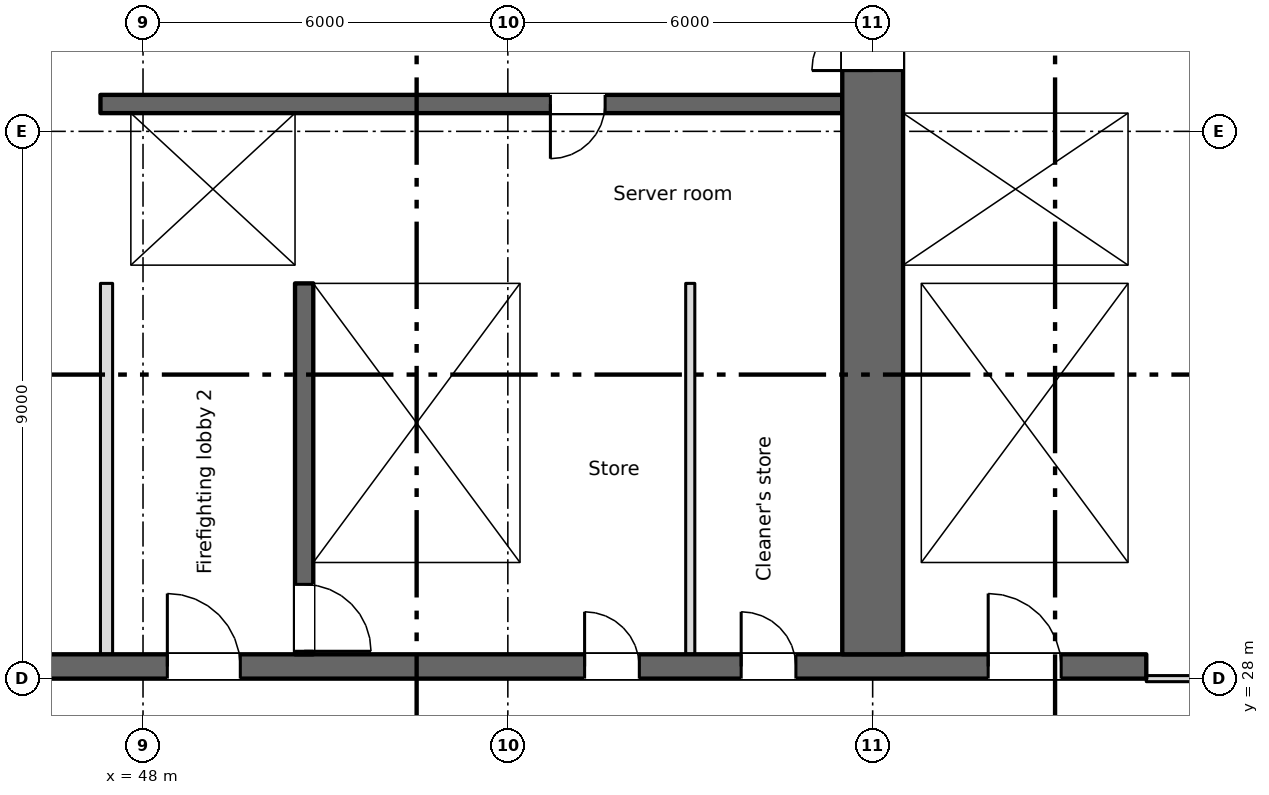
"""IFC4 building model, lengths in metres.
Left out: names, types, materials, properties, quantities, classifications, styles, units other than length and angle.
Written with IfcOpenShell. Run it as: python <this file> out.ifc"""

import sys

from ifc_helpers import new_model, si_unit, direction, frame, frame_2d, origin, place, context, subcontext, project, spatial, rectangle, extrude, element, fill, save


model = new_model("IFC4")
c1 = context("Model", 3, precision=1e-05, world=origin(), true_north=direction((0.0, 1.0)))
c2 = subcontext(c1, "Body", "Model", "MODEL_VIEW")
j1 = project(units=[si_unit("LENGTHUNIT", "METRE"), si_unit("PLANEANGLEUNIT", "RADIAN")], contexts=[c1])
p1 = place(None, origin())
s1 = spatial("IfcSite", under=j1, at=p1, CompositionType="ELEMENT")
p2 = place(p1, origin())
s2 = spatial("IfcBuilding", under=s1, at=p2, CompositionType="ELEMENT")
p3 = place(p2, frame((0.0, 0.0, 60.0)))
s3 = spatial("IfcBuildingStorey", under=s2, at=p3, CompositionType="ELEMENT", Elevation=60.0)
p4 = place(p3, frame((6.7, 28.2, 0.0), z_axis=(0.0, 0.0, 1.0), x_axis=(1.0, 0.0, 0.0)))
e1 = element("IfcWall", 1, at=p4, inside=s3, PredefinedType="SHEAR", context=c2, shape_type="SweptSolid", body=[
    extrude(rectangle(XDim=57.8, YDim=0.4, at=frame_2d((28.9, 0.0))), origin(), (0.0, 0.0, 1.0), 3.35),
])
p5 = place(p4, frame((13.85, 0.0, 0.0)))
e2 = element("IfcOpeningElement", 2, at=p5, cuts=e1, PredefinedType="OPENING", context=c2, shape_type="SweptSolid", body=[
    extrude(rectangle(XDim=0.9, YDim=2.1, at=frame_2d((0.45, 1.05))), frame((0.0, 0.21, 0.0), z_axis=(0.0, -1.0, 0.0), x_axis=(1.0, 0.0, 0.0)), (0.0, 0.0, 1.0), 0.42),
])
p6 = place(p4, frame((48.562, 0.0, 0.0)))
e3 = element("IfcOpeningElement", 3, at=p6, cuts=e1, PredefinedType="OPENING", context=c2, shape_type="SweptSolid", body=[
    extrude(rectangle(XDim=0.9, YDim=2.1, at=frame_2d((0.45, 1.05))), frame((0.0, 0.21, 0.0), z_axis=(0.0, -1.0, 0.0), x_axis=(1.0, 0.0, 0.0)), (0.0, 0.0, 1.0), 0.42),
])
p7 = place(p4, frame((51.137, 0.0, 0.0)))
e4 = element("IfcOpeningElement", 4, at=p7, cuts=e1, PredefinedType="OPENING", context=c2, shape_type="SweptSolid", body=[
    extrude(rectangle(XDim=0.9, YDim=2.1, at=frame_2d((0.45, 1.05))), frame((0.0, 0.21, 0.0), z_axis=(0.0, -1.0, 0.0), x_axis=(1.0, 0.0, 0.0)), (0.0, 0.0, 1.0), 0.42),
])
p8 = place(p4, frame((1.35, 0.0, 0.0)))
e5 = element("IfcOpeningElement", 5, at=p8, cuts=e1, PredefinedType="OPENING", context=c2, shape_type="SweptSolid", body=[
    extrude(rectangle(XDim=0.9, YDim=2.1, at=frame_2d((0.45, 1.05))), frame((0.0, 0.21, 0.0), z_axis=(0.0, -1.0, 0.0), x_axis=(1.0, 0.0, 0.0)), (0.0, 0.0, 1.0), 0.42),
])
p9 = place(p4, frame((4.7, 0.0, 0.0)))
e6 = element("IfcOpeningElement", 6, at=p9, cuts=e1, PredefinedType="OPENING", context=c2, shape_type="SweptSolid", body=[
    extrude(rectangle(XDim=1.2, YDim=2.1, at=frame_2d((0.6, 1.05))), frame((0.0, 0.21, 0.0), z_axis=(0.0, -1.0, 0.0), x_axis=(1.0, 0.0, 0.0)), (0.0, 0.0, 1.0), 0.42),
])
p10 = place(p4, frame((31.7, 0.0, 0.0)))
e7 = element("IfcOpeningElement", 7, at=p10, cuts=e1, PredefinedType="OPENING", context=c2, shape_type="SweptSolid", body=[
    extrude(rectangle(XDim=1.2, YDim=2.1, at=frame_2d((0.6, 1.05))), frame((0.0, 0.21, 0.0), z_axis=(0.0, -1.0, 0.0), x_axis=(1.0, 0.0, 0.0)), (0.0, 0.0, 1.0), 0.42),
])
p11 = place(p4, frame((55.2, 0.0, 0.0)))
e8 = element("IfcOpeningElement", 8, at=p11, cuts=e1, PredefinedType="OPENING", context=c2, shape_type="SweptSolid", body=[
    extrude(rectangle(XDim=1.2, YDim=2.1, at=frame_2d((0.6, 1.05))), frame((0.0, 0.21, 0.0), z_axis=(0.0, -1.0, 0.0), x_axis=(1.0, 0.0, 0.0)), (0.0, 0.0, 1.0), 0.42),
])
p12 = place(p4, frame((21.7, 0.0, 0.0)))
e9 = element("IfcOpeningElement", 9, at=p12, cuts=e1, PredefinedType="OPENING", context=c2, shape_type="SweptSolid", body=[
    extrude(rectangle(XDim=1.2, YDim=2.1, at=frame_2d((0.6, 1.05))), frame((0.0, 0.21, 0.0), z_axis=(0.0, -1.0, 0.0), x_axis=(1.0, 0.0, 0.0)), (0.0, 0.0, 1.0), 0.42),
])
p13 = place(p4, frame((41.7, 0.0, 0.0)))
e10 = element("IfcOpeningElement", 10, at=p13, cuts=e1, PredefinedType="OPENING", context=c2, shape_type="SweptSolid", body=[
    extrude(rectangle(XDim=1.2, YDim=2.1, at=frame_2d((0.6, 1.05))), frame((0.0, 0.21, 0.0), z_axis=(0.0, -1.0, 0.0), x_axis=(1.0, 0.0, 0.0)), (0.0, 0.0, 1.0), 0.42),
])
p14 = place(p4, frame((24.85, 0.0, 0.0)))
e11 = element("IfcOpeningElement", 11, at=p14, cuts=e1, PredefinedType="OPENING", context=c2, shape_type="SweptSolid", body=[
    extrude(rectangle(XDim=2.4, YDim=2.1, at=frame_2d((1.2, 1.05))), frame((0.0, 0.21, 0.0), z_axis=(0.0, -1.0, 0.0), x_axis=(1.0, 0.0, 0.0)), (0.0, 0.0, 1.0), 0.42),
])
p15 = place(p4, frame((37.35, 0.0, 0.0)))
e12 = element("IfcOpeningElement", 12, at=p15, cuts=e1, PredefinedType="OPENING", context=c2, shape_type="SweptSolid", body=[
    extrude(rectangle(XDim=2.4, YDim=2.1, at=frame_2d((1.2, 1.05))), frame((0.0, 0.21, 0.0), z_axis=(0.0, -1.0, 0.0), x_axis=(1.0, 0.0, 0.0)), (0.0, 0.0, 1.0), 0.42),
])
p16 = place(p4, frame((7.85, 0.0, 0.0)))
e13 = element("IfcOpeningElement", 13, at=p16, cuts=e1, PredefinedType="OPENING", context=c2, shape_type="SweptSolid", body=[
    extrude(rectangle(XDim=2.4, YDim=2.1, at=frame_2d((1.2, 1.05))), frame((0.0, 0.21, 0.0), z_axis=(0.0, -1.0, 0.0), x_axis=(1.0, 0.0, 0.0)), (0.0, 0.0, 1.0), 0.42),
])
p17 = place(p4, frame((28.85, 0.0, 0.0)))
e14 = element("IfcOpeningElement", 14, at=p17, cuts=e1, PredefinedType="OPENING", context=c2, shape_type="SweptSolid", body=[
    extrude(rectangle(XDim=0.9, YDim=2.1, at=frame_2d((0.45, 1.05))), frame((0.0, 0.21, 0.0), z_axis=(0.0, -1.0, 0.0), x_axis=(1.0, 0.0, 0.0)), (0.0, 0.0, 1.0), 0.42),
])
p18 = place(p4, frame((34.85, 0.0, 0.0)))
e15 = element("IfcOpeningElement", 15, at=p18, cuts=e1, PredefinedType="OPENING", context=c2, shape_type="SweptSolid", body=[
    extrude(rectangle(XDim=0.9, YDim=2.1, at=frame_2d((0.45, 1.05))), frame((0.0, 0.21, 0.0), z_axis=(0.0, -1.0, 0.0), x_axis=(1.0, 0.0, 0.0)), (0.0, 0.0, 1.0), 0.42),
])
p19 = place(p3, frame((64.35, 34.8, 0.0), z_axis=(0.0, 0.0, 1.0), x_axis=(0.0, 1.0, 0.0)))
e16 = element("IfcWall", 16, at=p19, inside=s3, PredefinedType="SHEAR", context=c2, shape_type="SweptSolid", body=[
    extrude(rectangle(XDim=10.2, YDim=0.3, at=frame_2d((5.1, 0.0))), origin(), (0.0, 0.0, 1.0), 3.35),
])
p20 = place(p3, frame((60.0, 28.4, 0.0), z_axis=(0.0, 0.0, 1.0), x_axis=(0.0, 1.0, 0.0)))
e17 = element("IfcWall", 17, at=p20, inside=s3, PredefinedType="SHEAR", context=c2, shape_type="SweptSolid", body=[
    extrude(rectangle(XDim=16.6, YDim=1.0, at=frame_2d((8.3, 0.0))), origin(), (0.0, 0.0, 1.0), 3.35),
])
p21 = place(p20, frame((9.6, 0.0, 0.0)))
e18 = element("IfcOpeningElement", 18, at=p21, cuts=e17, PredefinedType="OPENING", context=c2, shape_type="SweptSolid", body=[
    extrude(rectangle(XDim=2.0, YDim=2.1, at=frame_2d((1.0, 1.05))), frame((0.0, 0.51, 0.0), z_axis=(0.0, -1.0, 0.0), x_axis=(1.0, 0.0, 0.0)), (0.0, 0.0, 1.0), 1.02),
])
p22 = place(p20, frame((15.25, 0.0, 0.0)))
e19 = element("IfcOpeningElement", 19, at=p22, cuts=e17, PredefinedType="OPENING", context=c2, shape_type="SweptSolid", body=[
    extrude(rectangle(XDim=1.2, YDim=2.1, at=frame_2d((0.6, 1.05))), frame((0.0, 0.51, 0.0), z_axis=(0.0, -1.0, 0.0), x_axis=(1.0, 0.0, 0.0)), (0.0, 0.0, 1.0), 1.02),
])
p23 = place(p3, frame((50.65, 34.5, 0.0), z_axis=(0.0, 0.0, 1.0), x_axis=(0.0, -1.0, 0.0)))
e20 = element("IfcWall", 20, at=p23, inside=s3, PredefinedType="SHEAR", context=c2, shape_type="SweptSolid", body=[
    extrude(rectangle(XDim=6.1, YDim=0.3, at=frame_2d((3.05, 0.0))), origin(), (0.0, 0.0, 1.0), 3.35),
])
p24 = place(p23, frame((4.95, 0.0, 0.0)))
e21 = element("IfcOpeningElement", 21, at=p24, cuts=e20, PredefinedType="OPENING", context=c2, shape_type="SweptSolid", body=[
    extrude(rectangle(XDim=1.1, YDim=2.1, at=frame_2d((0.55, 1.05))), frame((0.0, 0.16, 0.0), z_axis=(0.0, -1.0, 0.0), x_axis=(1.0, 0.0, 0.0)), (0.0, 0.0, 1.0), 0.32),
])
for number, where, z_axis, x_axis in (
    (22, (54.35, 28.4, 0.0), (0.0, 0.0, 1.0), (0.0, 1.0, 0.0)),
    (23, (60.65, 28.4, 0.0), (0.0, 0.0, 1.0), (0.0, 1.0, 0.0)),
    (24, (64.35, 28.4, 0.0), (0.0, 0.0, 1.0), (0.0, 1.0, 0.0)),
):
    element("IfcWall", number, at=place(p3, frame(where, z_axis=z_axis, x_axis=x_axis)), inside=s3, PredefinedType="SHEAR", context=c2, shape_type="SweptSolid", body=[
        extrude(rectangle(XDim=6.1, YDim=0.3, at=frame_2d((3.05, 0.0))), origin(), (0.0, 0.0, 1.0), 3.35),
    ])
p25 = place(p3, frame((47.3, 34.65, 0.0), z_axis=(0.0, 0.0, 1.0), x_axis=(1.0, 0.0, 0.0)))
e25 = element("IfcWall", 25, at=p25, inside=s3, PredefinedType="SHEAR", context=c2, shape_type="SweptSolid", body=[
    extrude(rectangle(XDim=12.2, YDim=0.3, at=frame_2d((6.1, 0.0))), origin(), (0.0, 0.0, 1.0), 3.35),
])
p26 = place(p25, frame((1.3, 0.0, 0.0)))
e26 = element("IfcOpeningElement", 26, at=p26, cuts=e25, PredefinedType="OPENING", context=c2, shape_type="SweptSolid", body=[
    extrude(rectangle(XDim=1.1, YDim=2.1, at=frame_2d((0.55, 1.05))), frame((0.0, 0.16, 0.0), z_axis=(0.0, -1.0, 0.0), x_axis=(1.0, 0.0, 0.0)), (0.0, 0.0, 1.0), 0.32),
])
p27 = place(p3, frame((60.5, 34.65, 0.0), z_axis=(0.0, 0.0, 1.0), x_axis=(1.0, 0.0, 0.0)))
e27 = element("IfcWall", 27, at=p27, inside=s3, PredefinedType="SHEAR", context=c2, shape_type="SweptSolid", body=[
    extrude(rectangle(XDim=4.0, YDim=0.3, at=frame_2d((2.0, 0.0))), origin(), (0.0, 0.0, 1.0), 3.35),
])
p28 = place(p3, frame((59.5, 37.45, 0.0), z_axis=(0.0, 0.0, 1.0), x_axis=(-1.0, 0.0, 0.0)))
e28 = element("IfcWall", 28, at=p28, inside=s3, PredefinedType="SHEAR", context=c2, shape_type="SweptSolid", body=[
    extrude(rectangle(XDim=12.2, YDim=0.3, at=frame_2d((6.1, 0.0))), origin(), (0.0, 0.0, 1.0), 3.35),
])
p29 = place(p28, frame((3.9, 0.0, 0.0)))
e29 = element("IfcOpeningElement", 29, at=p29, cuts=e28, PredefinedType="OPENING", context=c2, shape_type="SweptSolid", body=[
    extrude(rectangle(XDim=0.9, YDim=2.1, at=frame_2d((0.45, 1.05))), frame((0.0, 0.16, 0.0), z_axis=(0.0, -1.0, 0.0), x_axis=(1.0, 0.0, 0.0)), (0.0, 0.0, 1.0), 0.32),
])
p30 = place(p3, frame((60.5, 37.45, 0.0), z_axis=(0.0, 0.0, 1.0), x_axis=(1.0, 0.0, 0.0)))
e30 = element("IfcWall", 30, at=p30, inside=s3, PredefinedType="SHEAR", context=c2, shape_type="SweptSolid", body=[
    extrude(rectangle(XDim=3.7, YDim=0.3, at=frame_2d((1.85, 0.0))), origin(), (0.0, 0.0, 1.0), 3.35),
])
p31 = place(p30, frame((1.3, 0.0, 0.0)))
e31 = element("IfcOpeningElement", 31, at=p31, cuts=e30, PredefinedType="OPENING", context=c2, shape_type="SweptSolid", body=[
    extrude(rectangle(XDim=1.1, YDim=2.1, at=frame_2d((0.55, 1.05))), frame((0.0, 0.16, 0.0), z_axis=(0.0, -1.0, 0.0), x_axis=(1.0, 0.0, 0.0)), (0.0, 0.0, 1.0), 0.32),
])
p32 = place(p3, frame((47.55, 34.8, 0.0), z_axis=(0.0, 0.0, 1.0), x_axis=(0.0, 1.0, 0.0)))
e32 = element("IfcWall", 32, at=p32, inside=s3, PredefinedType="SHEAR", context=c2, shape_type="SweptSolid", body=[
    extrude(rectangle(XDim=2.5, YDim=0.5, at=frame_2d((1.25, 0.0))), origin(), (0.0, 0.0, 1.0), 3.35),
])
p33 = place(p3, frame((50.65, 34.8, 0.0), z_axis=(0.0, 0.0, 1.0), x_axis=(0.0, 1.0, 0.0)))
e33 = element("IfcWall", 33, at=p33, inside=s3, PredefinedType="SHEAR", context=c2, shape_type="SweptSolid", body=[
    extrude(rectangle(XDim=2.5, YDim=0.3, at=frame_2d((1.25, 0.0))), origin(), (0.0, 0.0, 1.0), 3.35),
])
p34 = place(p3, frame((47.4, 28.4, 0.0), z_axis=(0.0, 0.0, 1.0), x_axis=(0.0, 1.0, 0.0)))
e34 = element("IfcWall", 34, at=p34, inside=s3, PredefinedType="PARTITIONING", context=c2, shape_type="SweptSolid", body=[
    extrude(rectangle(XDim=6.1, YDim=0.2, at=frame_2d((3.05, 0.0))), origin(), (0.0, 0.0, 1.0), 3.35),
])
p35 = place(p3, frame((57.0, 28.4, 0.0), z_axis=(0.0, 0.0, 1.0), x_axis=(0.0, 1.0, 0.0)))
e35 = element("IfcWall", 35, at=p35, inside=s3, PredefinedType="PARTITIONING", context=c2, shape_type="SweptSolid", body=[
    extrude(rectangle(XDim=6.1, YDim=0.15, at=frame_2d((3.05, 0.0))), origin(), (0.0, 0.0, 1.0), 3.35),
])
p36 = place(p3, frame((64.5, 28.0, 0.0), z_axis=(0.0, 0.0, 1.0), x_axis=(1.0, 0.0, 0.0)))
e36 = element("IfcWall", 36, at=p36, inside=s3, PredefinedType="PARTITIONING", context=c2, shape_type="SweptSolid", body=[
    extrude(rectangle(XDim=12.7, YDim=0.1, at=frame_2d((6.35, 0.0))), origin(), (0.0, 0.0, 1.0), 3.35),
])
p37 = place(p36, frame((2.575, 0.0, 0.0)))
e37 = element("IfcOpeningElement", 37, at=p37, cuts=e36, PredefinedType="OPENING", context=c2, shape_type="SweptSolid", body=[
    extrude(rectangle(XDim=1.2, YDim=2.1, at=frame_2d((0.6, 1.05))), frame((0.0, 0.06, 0.0), z_axis=(0.0, -1.0, 0.0), x_axis=(1.0, 0.0, 0.0)), (0.0, 0.0, 1.0), 0.12),
])
p38 = place(p36, frame((8.925, 0.0, 0.0)))
e38 = element("IfcOpeningElement", 38, at=p38, cuts=e36, PredefinedType="OPENING", context=c2, shape_type="SweptSolid", body=[
    extrude(rectangle(XDim=1.2, YDim=2.1, at=frame_2d((0.6, 1.05))), frame((0.0, 0.06, 0.0), z_axis=(0.0, -1.0, 0.0), x_axis=(1.0, 0.0, 0.0)), (0.0, 0.0, 1.0), 0.12),
])
p39 = place(p6, origin())
e39 = element("IfcDoor", 39, at=p39, inside=s3, OperationType="SINGLE_SWING_LEFT", PredefinedType="DOOR", context=c2, shape_type="SweptSolid", body=[
    extrude(rectangle(XDim=0.9, YDim=2.1, at=frame_2d((0.45, 1.05))), frame((0.0, 0.025, 0.0), z_axis=(0.0, -1.0, 0.0), x_axis=(1.0, 0.0, 0.0)), (0.0, 0.0, 1.0), 0.05),
])
fill(e3, e39)
p40 = place(p7, origin())
e40 = element("IfcDoor", 40, at=p40, inside=s3, OperationType="SINGLE_SWING_LEFT", PredefinedType="DOOR", context=c2, shape_type="SweptSolid", body=[
    extrude(rectangle(XDim=0.9, YDim=2.1, at=frame_2d((0.45, 1.05))), frame((0.0, 0.025, 0.0), z_axis=(0.0, -1.0, 0.0), x_axis=(1.0, 0.0, 0.0)), (0.0, 0.0, 1.0), 0.05),
])
fill(e4, e40)
p41 = place(p29, origin())
e41 = element("IfcDoor", 41, at=p41, inside=s3, OperationType="SINGLE_SWING_RIGHT", PredefinedType="DOOR", context=c2, shape_type="SweptSolid", body=[
    extrude(rectangle(XDim=0.9, YDim=2.1, at=frame_2d((0.45, 1.05))), frame((0.0, 0.025, 0.0), z_axis=(0.0, -1.0, 0.0), x_axis=(1.0, 0.0, 0.0)), (0.0, 0.0, 1.0), 0.05),
])
fill(e29, e41)
p42 = place(p31, origin())
e42 = element("IfcDoor", 42, at=p42, inside=s3, OperationType="SLIDING_TO_LEFT", PredefinedType="DOOR", context=c2, shape_type="SweptSolid", body=[
    extrude(rectangle(XDim=1.1, YDim=2.1, at=frame_2d((0.55, 1.05))), frame((0.0, 0.025, 0.0), z_axis=(0.0, -1.0, 0.0), x_axis=(1.0, 0.0, 0.0)), (0.0, 0.0, 1.0), 0.05),
])
fill(e31, e42)
p43 = place(p26, origin())
e43 = element("IfcDoor", 43, at=p43, inside=s3, OperationType="SLIDING_TO_LEFT", PredefinedType="DOOR", context=c2, shape_type="SweptSolid", body=[
    extrude(rectangle(XDim=1.1, YDim=2.1, at=frame_2d((0.55, 1.05))), frame((0.0, 0.025, 0.0), z_axis=(0.0, -1.0, 0.0), x_axis=(1.0, 0.0, 0.0)), (0.0, 0.0, 1.0), 0.05),
])
fill(e26, e43)
p44 = place(p24, origin())
e44 = element("IfcDoor", 44, at=p44, inside=s3, OperationType="SINGLE_SWING_RIGHT", PredefinedType="DOOR", context=c2, shape_type="SweptSolid", body=[
    extrude(rectangle(XDim=1.1, YDim=2.1, at=frame_2d((0.55, 1.05))), frame((0.0, 0.025, 0.0), z_axis=(0.0, -1.0, 0.0), x_axis=(1.0, 0.0, 0.0)), (0.0, 0.0, 1.0), 0.05),
])
fill(e21, e44)
p45 = place(p11, origin())
e45 = element("IfcDoor", 45, at=p45, inside=s3, OperationType="SINGLE_SWING_LEFT", PredefinedType="DOOR", context=c2, shape_type="SweptSolid", body=[
    extrude(rectangle(XDim=1.2, YDim=2.1, at=frame_2d((0.6, 1.05))), frame((0.0, 0.025, 0.0), z_axis=(0.0, -1.0, 0.0), x_axis=(1.0, 0.0, 0.0)), (0.0, 0.0, 1.0), 0.05),
])
fill(e8, e45)
p46 = place(p13, origin())
e46 = element("IfcDoor", 46, at=p46, inside=s3, OperationType="SINGLE_SWING_LEFT", PredefinedType="DOOR", context=c2, shape_type="SweptSolid", body=[
    extrude(rectangle(XDim=1.2, YDim=2.1, at=frame_2d((0.6, 1.05))), frame((0.0, 0.025, 0.0), z_axis=(0.0, -1.0, 0.0), x_axis=(1.0, 0.0, 0.0)), (0.0, 0.0, 1.0), 0.05),
])
fill(e10, e46)
p47 = place(p21, origin())
e47 = element("IfcDoor", 47, at=p47, inside=s3, OperationType="DOUBLE_DOOR_SINGLE_SWING", PredefinedType="DOOR", context=c2, shape_type="SweptSolid", body=[
    extrude(rectangle(XDim=2.0, YDim=2.1, at=frame_2d((1.0, 1.05))), frame((0.0, 0.025, 0.0), z_axis=(0.0, -1.0, 0.0), x_axis=(1.0, 0.0, 0.0)), (0.0, 0.0, 1.0), 0.05),
])
fill(e18, e47)
save(model, sys.argv[1])
